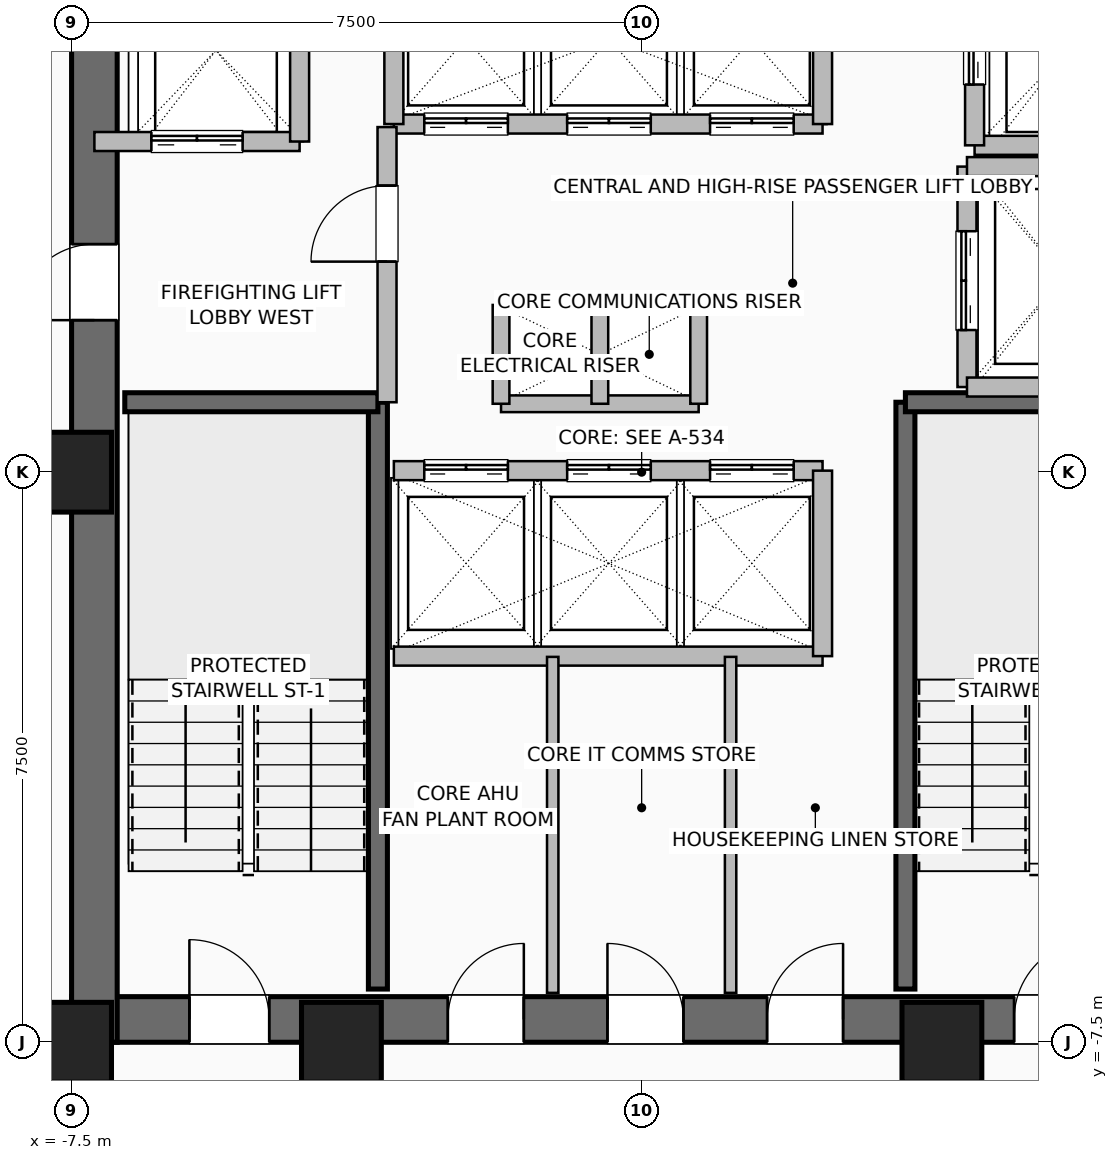
"""IFC4 building model, lengths in metres.
Left out: names, types, materials, properties, quantities, classifications, styles, units other than length and angle.
Written with IfcOpenShell. Run it as: python <this file> out.ifc"""

import sys

from ifc_helpers import new_model, si_unit, direction, frame, frame_2d, origin, origin_2d, place, context, subcontext, project, spatial, rectangle, hollow_rectangle, extrude, element, fill, save


model = new_model("IFC4")
c1 = context("Model", 3, precision=1e-05, world=origin(), true_north=direction((0.0, 1.0)))
c2 = subcontext(c1, "Body", "Model", "MODEL_VIEW")
j1 = project(units=[si_unit("LENGTHUNIT", "METRE"), si_unit("PLANEANGLEUNIT", "RADIAN")], contexts=[c1])
p1 = place(None, origin())
s1 = spatial("IfcSite", under=j1, at=p1, CompositionType="ELEMENT")
p2 = place(p1, origin())
s2 = spatial("IfcBuilding", under=s1, at=p2, CompositionType="ELEMENT")
p3 = place(p2, frame((0.0, 0.0, 130.0)))
s3 = spatial("IfcBuildingStorey", under=s2, at=p3, CompositionType="ELEMENT", Elevation=130.0)
for number, where, z_axis, x_axis in (
    (1, (-7.5, -7.5, 0.0), (0.0, 0.0, 1.0), (1.0, 0.0, 0.0)),
    (2, (-3.95, -7.5, 0.0), (0.0, 0.0, 1.0), (1.0, 0.0, 0.0)),
    (3, (3.95, -7.5, 0.0), (0.0, 0.0, 1.0), (1.0, 0.0, 0.0)),
    (4, (-7.5, 0.0, 0.0), (0.0, 0.0, 1.0), (1.0, 0.0, 0.0)),
):
    element("IfcColumn", number, at=place(p3, frame(where, z_axis=z_axis, x_axis=x_axis)), inside=s3, PredefinedType="COLUMN", context=c2, shape_type="SweptSolid", body=[
        extrude(hollow_rectangle(XDim=1.05, YDim=1.05, WallThickness=0.05, at=origin_2d()), origin(), (0.0, 0.0, 1.0), 3.6),
    ])
p4 = place(p3, frame((-7.5, -7.2, 0.0), z_axis=(0.0, 0.0, 1.0), x_axis=(1.0, 0.0, 0.0)))
e5 = element("IfcWall", 5, at=p4, inside=s3, PredefinedType="SHEAR", context=c2, shape_type="SweptSolid", body=[
    extrude(rectangle(XDim=15.0, YDim=0.6, at=frame_2d((7.5, 0.0))), origin(), (0.0, 0.0, 1.0), 3.36),
])
p5 = place(p4, frame((1.55, 0.0, 0.0)))
e6 = element("IfcOpeningElement", 6, at=p5, cuts=e5, PredefinedType="OPENING", context=c2, shape_type="SweptSolid", body=[
    extrude(rectangle(XDim=1.05, YDim=2.08, at=frame_2d((0.525, 1.04))), frame((0.0, 0.31, 0.0), z_axis=(0.0, -1.0, 0.0), x_axis=(1.0, 0.0, 0.0)), (0.0, 0.0, 1.0), 0.62),
])
p6 = place(p4, frame((12.4, 0.0, 0.0)))
e7 = element("IfcOpeningElement", 7, at=p6, cuts=e5, PredefinedType="OPENING", context=c2, shape_type="SweptSolid", body=[
    extrude(rectangle(XDim=1.05, YDim=2.08, at=frame_2d((0.525, 1.04))), frame((0.0, 0.31, 0.0), z_axis=(0.0, -1.0, 0.0), x_axis=(1.0, 0.0, 0.0)), (0.0, 0.0, 1.0), 0.62),
])
p7 = place(p4, frame((4.95, 0.0, 0.0)))
e8 = element("IfcOpeningElement", 8, at=p7, cuts=e5, PredefinedType="OPENING", context=c2, shape_type="SweptSolid", body=[
    extrude(rectangle(XDim=1.0, YDim=2.08, at=frame_2d((0.5, 1.04))), frame((0.0, 0.31, 0.0), z_axis=(0.0, -1.0, 0.0), x_axis=(1.0, 0.0, 0.0)), (0.0, 0.0, 1.0), 0.62),
])
p8 = place(p4, frame((7.05, 0.0, 0.0)))
e9 = element("IfcOpeningElement", 9, at=p8, cuts=e5, PredefinedType="OPENING", context=c2, shape_type="SweptSolid", body=[
    extrude(rectangle(XDim=1.0, YDim=2.08, at=frame_2d((0.5, 1.04))), frame((0.0, 0.31, 0.0), z_axis=(0.0, -1.0, 0.0), x_axis=(1.0, 0.0, 0.0)), (0.0, 0.0, 1.0), 0.62),
])
p9 = place(p4, frame((9.15, 0.0, 0.0)))
e10 = element("IfcOpeningElement", 10, at=p9, cuts=e5, PredefinedType="OPENING", context=c2, shape_type="SweptSolid", body=[
    extrude(rectangle(XDim=1.0, YDim=2.08, at=frame_2d((0.5, 1.04))), frame((0.0, 0.31, 0.0), z_axis=(0.0, -1.0, 0.0), x_axis=(1.0, 0.0, 0.0)), (0.0, 0.0, 1.0), 0.62),
])
p10 = place(p3, frame((-7.2, -7.5, 0.0), z_axis=(0.0, 0.0, 1.0), x_axis=(0.0, 1.0, 0.0)))
e11 = element("IfcWall", 11, at=p10, inside=s3, PredefinedType="SHEAR", context=c2, shape_type="SweptSolid", body=[
    extrude(rectangle(XDim=15.0, YDim=0.6, at=frame_2d((7.5, 0.0))), origin(), (0.0, 0.0, 1.0), 3.36),
])
p11 = place(p10, frame((9.5, 0.0, 0.0)))
e12 = element("IfcOpeningElement", 12, at=p11, cuts=e11, PredefinedType="OPENING", context=c2, shape_type="SweptSolid", body=[
    extrude(rectangle(XDim=1.0, YDim=2.08, at=frame_2d((0.5, 1.04))), frame((0.0, 0.31, 0.0), z_axis=(0.0, -1.0, 0.0), x_axis=(1.0, 0.0, 0.0)), (0.0, 0.0, 1.0), 0.62),
])
p12 = place(p3, frame((-3.47, -6.8, 0.0), z_axis=(0.0, 0.0, 1.0), x_axis=(0.0, 1.0, 0.0)))
e13 = element("IfcWall", 13, at=p12, inside=s3, PredefinedType="SHEAR", context=c2, shape_type="SweptSolid", body=[
    extrude(rectangle(XDim=7.72, YDim=0.25, at=frame_2d((3.86, 0.0))), origin(), (0.0, 0.0, 1.0), 3.36),
])
p13 = place(p3, frame((-6.8, 0.92, 0.0), z_axis=(0.0, 0.0, 1.0), x_axis=(1.0, 0.0, 0.0)))
e14 = element("IfcWall", 14, at=p13, inside=s3, PredefinedType="SHEAR", context=c2, shape_type="SweptSolid", body=[
    extrude(rectangle(XDim=3.33, YDim=0.25, at=frame_2d((1.665, 0.0))), origin(), (0.0, 0.0, 1.0), 3.36),
])
p14 = place(p3, frame((3.47, -6.8, 0.0), z_axis=(0.0, 0.0, 1.0), x_axis=(0.0, 1.0, 0.0)))
e15 = element("IfcWall", 15, at=p14, inside=s3, PredefinedType="SHEAR", context=c2, shape_type="SweptSolid", body=[
    extrude(rectangle(XDim=7.72, YDim=0.25, at=frame_2d((3.86, 0.0))), origin(), (0.0, 0.0, 1.0), 3.36),
])
p15 = place(p3, frame((3.47, 0.92, 0.0), z_axis=(0.0, 0.0, 1.0), x_axis=(1.0, 0.0, 0.0)))
e16 = element("IfcWall", 16, at=p15, inside=s3, PredefinedType="SHEAR", context=c2, shape_type="SweptSolid", body=[
    extrude(rectangle(XDim=3.33, YDim=0.25, at=frame_2d((1.665, 0.0))), origin(), (0.0, 0.0, 1.0), 3.36),
])
for number, where, z_axis, x_axis in (
    (17, (-1.85, 2.2, 0.0), (0.0, 0.0, 1.0), (1.0, 0.0, 0.0)),
    (18, (-1.85, 0.9, 0.0), (0.0, 0.0, 1.0), (1.0, 0.0, 0.0)),
):
    element("IfcWall", number, at=place(p3, frame(where, z_axis=z_axis, x_axis=x_axis)), inside=s3, PredefinedType="PARTITIONING", context=c2, shape_type="SweptSolid", body=[
        extrude(rectangle(XDim=2.6, YDim=0.22, at=frame_2d((1.3, 0.0))), origin(), (0.0, 0.0, 1.0), 3.36),
    ])
for number, where, z_axis, x_axis in (
    (19, (-0.55, 0.9, 0.0), (0.0, 0.0, 1.0), (0.0, 1.0, 0.0)),
    (20, (0.75, 0.9, 0.0), (0.0, 0.0, 1.0), (0.0, 1.0, 0.0)),
    (21, (-1.85, 0.9, 0.0), (0.0, 0.0, 1.0), (0.0, 1.0, 0.0)),
):
    element("IfcWall", number, at=place(p3, frame(where, z_axis=z_axis, x_axis=x_axis)), inside=s3, PredefinedType="PARTITIONING", context=c2, shape_type="SweptSolid", body=[
        extrude(rectangle(XDim=1.3, YDim=0.22, at=frame_2d((0.65, 0.0))), origin(), (0.0, 0.0, 1.0), 3.36),
    ])
p16 = place(p3, frame((-3.26, 0.02, 0.0), z_axis=(0.0, 0.0, 1.0), x_axis=(1.0, 0.0, 0.0)))
e22 = element("IfcWall", 22, at=p16, inside=s3, PredefinedType="SHEAR", context=c2, shape_type="SweptSolid", body=[
    extrude(rectangle(XDim=5.64, YDim=0.25, at=frame_2d((2.82, 0.0))), origin(), (0.0, 0.0, 1.0), 3.36),
])
p17 = place(p16, frame((0.4, 0.0, 0.0)))
e23 = element("IfcOpeningElement", 23, at=p17, cuts=e22, PredefinedType="OPENING", context=c2, shape_type="SweptSolid", body=[
    extrude(rectangle(XDim=1.1, YDim=2.2, at=frame_2d((0.55, 1.1))), frame((0.0, 0.135, 0.0), z_axis=(0.0, -1.0, 0.0), x_axis=(1.0, 0.0, 0.0)), (0.0, 0.0, 1.0), 0.27),
])
p18 = place(p16, frame((2.28, 0.0, 0.0)))
e24 = element("IfcOpeningElement", 24, at=p18, cuts=e22, PredefinedType="OPENING", context=c2, shape_type="SweptSolid", body=[
    extrude(rectangle(XDim=1.1, YDim=2.2, at=frame_2d((0.55, 1.1))), frame((0.0, 0.135, 0.0), z_axis=(0.0, -1.0, 0.0), x_axis=(1.0, 0.0, 0.0)), (0.0, 0.0, 1.0), 0.27),
])
p19 = place(p16, frame((4.16, 0.0, 0.0)))
e25 = element("IfcOpeningElement", 25, at=p19, cuts=e22, PredefinedType="OPENING", context=c2, shape_type="SweptSolid", body=[
    extrude(rectangle(XDim=1.1, YDim=2.2, at=frame_2d((0.55, 1.1))), frame((0.0, 0.135, 0.0), z_axis=(0.0, -1.0, 0.0), x_axis=(1.0, 0.0, 0.0)), (0.0, 0.0, 1.0), 0.27),
])
p20 = place(p3, frame((-3.26, -2.42, 0.0), z_axis=(0.0, 0.0, 1.0), x_axis=(1.0, 0.0, 0.0)))
e26 = element("IfcWall", 26, at=p20, inside=s3, PredefinedType="SHEAR", context=c2, shape_type="SweptSolid", body=[
    extrude(rectangle(XDim=5.64, YDim=0.25, at=frame_2d((2.82, 0.0))), origin(), (0.0, 0.0, 1.0), 3.36),
])
p21 = place(p3, frame((2.38, -2.42, 0.0), z_axis=(0.0, 0.0, 1.0), x_axis=(0.0, 1.0, 0.0)))
e27 = element("IfcWall", 27, at=p21, inside=s3, PredefinedType="SHEAR", context=c2, shape_type="SweptSolid", body=[
    extrude(rectangle(XDim=2.44, YDim=0.25, at=frame_2d((1.22, 0.0))), origin(), (0.0, 0.0, 1.0), 3.36),
])
p22 = place(p3, frame((-3.26, 4.58, 0.0), z_axis=(0.0, 0.0, 1.0), x_axis=(1.0, 0.0, 0.0)))
e28 = element("IfcWall", 28, at=p22, inside=s3, PredefinedType="SHEAR", context=c2, shape_type="SweptSolid", body=[
    extrude(rectangle(XDim=5.64, YDim=0.25, at=frame_2d((2.82, 0.0))), origin(), (0.0, 0.0, 1.0), 3.36),
])
p23 = place(p22, frame((0.4, 0.0, 0.0)))
e29 = element("IfcOpeningElement", 29, at=p23, cuts=e28, PredefinedType="OPENING", context=c2, shape_type="SweptSolid", body=[
    extrude(rectangle(XDim=1.1, YDim=2.2, at=frame_2d((0.55, 1.1))), frame((0.0, 0.135, 0.0), z_axis=(0.0, -1.0, 0.0), x_axis=(1.0, 0.0, 0.0)), (0.0, 0.0, 1.0), 0.27),
])
p24 = place(p22, frame((2.28, 0.0, 0.0)))
e30 = element("IfcOpeningElement", 30, at=p24, cuts=e28, PredefinedType="OPENING", context=c2, shape_type="SweptSolid", body=[
    extrude(rectangle(XDim=1.1, YDim=2.2, at=frame_2d((0.55, 1.1))), frame((0.0, 0.135, 0.0), z_axis=(0.0, -1.0, 0.0), x_axis=(1.0, 0.0, 0.0)), (0.0, 0.0, 1.0), 0.27),
])
p25 = place(p22, frame((4.16, 0.0, 0.0)))
e31 = element("IfcOpeningElement", 31, at=p25, cuts=e28, PredefinedType="OPENING", context=c2, shape_type="SweptSolid", body=[
    extrude(rectangle(XDim=1.1, YDim=2.2, at=frame_2d((0.55, 1.1))), frame((0.0, 0.135, 0.0), z_axis=(0.0, -1.0, 0.0), x_axis=(1.0, 0.0, 0.0)), (0.0, 0.0, 1.0), 0.27),
])
for number, where, z_axis, x_axis in (
    (32, (-3.26, 4.58, 0.0), (0.0, 0.0, 1.0), (0.0, 1.0, 0.0)),
    (33, (2.38, 4.58, 0.0), (0.0, 0.0, 1.0), (0.0, 1.0, 0.0)),
):
    element("IfcWall", number, at=place(p3, frame(where, z_axis=z_axis, x_axis=x_axis)), inside=s3, PredefinedType="SHEAR", context=c2, shape_type="SweptSolid", body=[
        extrude(rectangle(XDim=2.22, YDim=0.25, at=frame_2d((1.11, 0.0))), origin(), (0.0, 0.0, 1.0), 3.36),
    ])
p26 = place(p3, frame((-7.2, 4.35, 0.0), z_axis=(0.0, 0.0, 1.0), x_axis=(1.0, 0.0, 0.0)))
e34 = element("IfcWall", 34, at=p26, inside=s3, PredefinedType="SHEAR", context=c2, shape_type="SweptSolid", body=[
    extrude(rectangle(XDim=2.7, YDim=0.25, at=frame_2d((1.35, 0.0))), origin(), (0.0, 0.0, 1.0), 3.36),
])
p27 = place(p26, frame((0.75, 0.0, 0.0)))
e35 = element("IfcOpeningElement", 35, at=p27, cuts=e34, PredefinedType="OPENING", context=c2, shape_type="SweptSolid", body=[
    extrude(rectangle(XDim=1.2, YDim=2.2, at=frame_2d((0.6, 1.1))), frame((0.0, 0.135, 0.0), z_axis=(0.0, -1.0, 0.0), x_axis=(1.0, 0.0, 0.0)), (0.0, 0.0, 1.0), 0.27),
])
p28 = place(p3, frame((-4.5, 4.35, 0.0), z_axis=(0.0, 0.0, 1.0), x_axis=(0.0, 1.0, 0.0)))
e36 = element("IfcWall", 36, at=p28, inside=s3, PredefinedType="SHEAR", context=c2, shape_type="SweptSolid", body=[
    extrude(rectangle(XDim=2.85, YDim=0.25, at=frame_2d((1.425, 0.0))), origin(), (0.0, 0.0, 1.0), 3.36),
])
p29 = place(p3, frame((4.38, 4.3, 0.0), z_axis=(0.0, 0.0, 1.0), x_axis=(1.0, 0.0, 0.0)))
e37 = element("IfcWall", 37, at=p29, inside=s3, PredefinedType="SHEAR", context=c2, shape_type="SweptSolid", body=[
    extrude(rectangle(XDim=2.42, YDim=0.25, at=frame_2d((1.21, 0.0))), origin(), (0.0, 0.0, 1.0), 3.36),
])
p30 = place(p3, frame((4.38, 4.3, 0.0), z_axis=(0.0, 0.0, 1.0), x_axis=(0.0, 1.0, 0.0)))
e38 = element("IfcWall", 38, at=p30, inside=s3, PredefinedType="SHEAR", context=c2, shape_type="SweptSolid", body=[
    extrude(rectangle(XDim=2.5, YDim=0.25, at=frame_2d((1.25, 0.0))), origin(), (0.0, 0.0, 1.0), 3.36),
])
p31 = place(p30, frame((0.8, 0.0, 0.0)))
e39 = element("IfcOpeningElement", 39, at=p31, cuts=e38, PredefinedType="OPENING", context=c2, shape_type="SweptSolid", body=[
    extrude(rectangle(XDim=1.2, YDim=2.2, at=frame_2d((0.6, 1.1))), frame((0.0, 0.135, 0.0), z_axis=(0.0, -1.0, 0.0), x_axis=(1.0, 0.0, 0.0)), (0.0, 0.0, 1.0), 0.27),
])
p32 = place(p3, frame((4.28, 1.12, 0.0), z_axis=(0.0, 0.0, 1.0), x_axis=(0.0, 1.0, 0.0)))
e40 = element("IfcWall", 40, at=p32, inside=s3, PredefinedType="SHEAR", context=c2, shape_type="SweptSolid", body=[
    extrude(rectangle(XDim=2.9, YDim=0.25, at=frame_2d((1.45, 0.0))), origin(), (0.0, 0.0, 1.0), 3.36),
])
p33 = place(p32, frame((0.75, 0.0, 0.0)))
e41 = element("IfcOpeningElement", 41, at=p33, cuts=e40, PredefinedType="OPENING", context=c2, shape_type="SweptSolid", body=[
    extrude(rectangle(XDim=1.3, YDim=2.3, at=frame_2d((0.65, 1.15))), frame((0.0, 0.135, 0.0), z_axis=(0.0, -1.0, 0.0), x_axis=(1.0, 0.0, 0.0)), (0.0, 0.0, 1.0), 0.27),
])
for number, where, z_axis, x_axis in (
    (42, (4.28, 1.12, 0.0), (0.0, 0.0, 1.0), (1.0, 0.0, 0.0)),
    (43, (4.28, 4.02, 0.0), (0.0, 0.0, 1.0), (1.0, 0.0, 0.0)),
):
    element("IfcWall", number, at=place(p3, frame(where, z_axis=z_axis, x_axis=x_axis)), inside=s3, PredefinedType="SHEAR", context=c2, shape_type="SweptSolid", body=[
        extrude(rectangle(XDim=2.52, YDim=0.25, at=frame_2d((1.26, 0.0))), origin(), (0.0, 0.0, 1.0), 3.36),
    ])
p34 = place(p3, frame((-3.35, 0.92, 0.0), z_axis=(0.0, 0.0, 1.0), x_axis=(0.0, 1.0, 0.0)))
e44 = element("IfcWall", 44, at=p34, inside=s3, PredefinedType="SHEAR", context=c2, shape_type="SweptSolid", body=[
    extrude(rectangle(XDim=3.62, YDim=0.25, at=frame_2d((1.81, 0.0))), origin(), (0.0, 0.0, 1.0), 3.36),
])
p35 = place(p34, frame((1.85, 0.0, 0.0)))
e45 = element("IfcOpeningElement", 45, at=p35, cuts=e44, PredefinedType="OPENING", context=c2, shape_type="SweptSolid", body=[
    extrude(rectangle(XDim=1.0, YDim=2.08, at=frame_2d((0.5, 1.04))), frame((0.0, 0.135, 0.0), z_axis=(0.0, -1.0, 0.0), x_axis=(1.0, 0.0, 0.0)), (0.0, 0.0, 1.0), 0.27),
])
for number, where, z_axis, x_axis in (
    (46, (-1.17, -6.85, 0.0), (0.0, 0.0, 1.0), (0.0, 1.0, 0.0)),
    (47, (1.17, -6.85, 0.0), (0.0, 0.0, 1.0), (0.0, 1.0, 0.0)),
):
    element("IfcWall", number, at=place(p3, frame(where, z_axis=z_axis, x_axis=x_axis)), inside=s3, PredefinedType="PARTITIONING", context=c2, shape_type="SweptSolid", body=[
        extrude(rectangle(XDim=4.42, YDim=0.15, at=frame_2d((2.21, 0.0))), origin(), (0.0, 0.0, 1.0), 3.36),
    ])
p36 = place(p5, origin())
e48 = element("IfcDoor", 48, at=p36, inside=s3, OperationType="SINGLE_SWING_LEFT", PredefinedType="DOOR", context=c2, shape_type="SweptSolid", body=[
    extrude(rectangle(XDim=1.05, YDim=2.08, at=frame_2d((0.525, 1.04))), frame((0.0, 0.025, 0.0), z_axis=(0.0, -1.0, 0.0), x_axis=(1.0, 0.0, 0.0)), (0.0, 0.0, 1.0), 0.05),
])
fill(e6, e48)
p37 = place(p6, origin())
e49 = element("IfcDoor", 49, at=p37, inside=s3, OperationType="SINGLE_SWING_RIGHT", PredefinedType="DOOR", context=c2, shape_type="SweptSolid", body=[
    extrude(rectangle(XDim=1.05, YDim=2.08, at=frame_2d((0.525, 1.04))), frame((0.0, 0.025, 0.0), z_axis=(0.0, -1.0, 0.0), x_axis=(1.0, 0.0, 0.0)), (0.0, 0.0, 1.0), 0.05),
])
fill(e7, e49)
p38 = place(p11, origin())
e50 = element("IfcDoor", 50, at=p38, inside=s3, OperationType="SINGLE_SWING_LEFT", PredefinedType="DOOR", context=c2, shape_type="SweptSolid", body=[
    extrude(rectangle(XDim=1.0, YDim=2.08, at=frame_2d((0.5, 1.04))), frame((0.0, 0.025, 0.0), z_axis=(0.0, -1.0, 0.0), x_axis=(1.0, 0.0, 0.0)), (0.0, 0.0, 1.0), 0.05),
])
fill(e12, e50)
p39 = place(p7, origin())
e51 = element("IfcDoor", 51, at=p39, inside=s3, OperationType="SINGLE_SWING_RIGHT", PredefinedType="DOOR", context=c2, shape_type="SweptSolid", body=[
    extrude(rectangle(XDim=1.0, YDim=2.08, at=frame_2d((0.5, 1.04))), frame((0.0, 0.025, 0.0), z_axis=(0.0, -1.0, 0.0), x_axis=(1.0, 0.0, 0.0)), (0.0, 0.0, 1.0), 0.05),
])
fill(e8, e51)
p40 = place(p8, origin())
e52 = element("IfcDoor", 52, at=p40, inside=s3, OperationType="SINGLE_SWING_LEFT", PredefinedType="DOOR", context=c2, shape_type="SweptSolid", body=[
    extrude(rectangle(XDim=1.0, YDim=2.08, at=frame_2d((0.5, 1.04))), frame((0.0, 0.025, 0.0), z_axis=(0.0, -1.0, 0.0), x_axis=(1.0, 0.0, 0.0)), (0.0, 0.0, 1.0), 0.05),
])
fill(e9, e52)
p41 = place(p9, origin())
e53 = element("IfcDoor", 53, at=p41, inside=s3, OperationType="SINGLE_SWING_RIGHT", PredefinedType="DOOR", context=c2, shape_type="SweptSolid", body=[
    extrude(rectangle(XDim=1.0, YDim=2.08, at=frame_2d((0.5, 1.04))), frame((0.0, 0.025, 0.0), z_axis=(0.0, -1.0, 0.0), x_axis=(1.0, 0.0, 0.0)), (0.0, 0.0, 1.0), 0.05),
])
fill(e10, e53)
p42 = place(p17, origin())
e54 = element("IfcDoor", 54, at=p42, inside=s3, OperationType="DOUBLE_DOOR_SLIDING", PredefinedType="DOOR", context=c2, shape_type="SweptSolid", body=[
    extrude(rectangle(XDim=1.1, YDim=2.2, at=frame_2d((0.55, 1.1))), frame((0.0, 0.025, 0.0), z_axis=(0.0, -1.0, 0.0), x_axis=(1.0, 0.0, 0.0)), (0.0, 0.0, 1.0), 0.05),
])
fill(e23, e54)
p43 = place(p18, origin())
e55 = element("IfcDoor", 55, at=p43, inside=s3, OperationType="DOUBLE_DOOR_SLIDING", PredefinedType="DOOR", context=c2, shape_type="SweptSolid", body=[
    extrude(rectangle(XDim=1.1, YDim=2.2, at=frame_2d((0.55, 1.1))), frame((0.0, 0.025, 0.0), z_axis=(0.0, -1.0, 0.0), x_axis=(1.0, 0.0, 0.0)), (0.0, 0.0, 1.0), 0.05),
])
fill(e24, e55)
p44 = place(p19, origin())
e56 = element("IfcDoor", 56, at=p44, inside=s3, OperationType="DOUBLE_DOOR_SLIDING", PredefinedType="DOOR", context=c2, shape_type="SweptSolid", body=[
    extrude(rectangle(XDim=1.1, YDim=2.2, at=frame_2d((0.55, 1.1))), frame((0.0, 0.025, 0.0), z_axis=(0.0, -1.0, 0.0), x_axis=(1.0, 0.0, 0.0)), (0.0, 0.0, 1.0), 0.05),
])
fill(e25, e56)
p45 = place(p23, origin())
e57 = element("IfcDoor", 57, at=p45, inside=s3, OperationType="DOUBLE_DOOR_SLIDING", PredefinedType="DOOR", context=c2, shape_type="SweptSolid", body=[
    extrude(rectangle(XDim=1.1, YDim=2.2, at=frame_2d((0.55, 1.1))), frame((0.0, 0.025, 0.0), z_axis=(0.0, -1.0, 0.0), x_axis=(1.0, 0.0, 0.0)), (0.0, 0.0, 1.0), 0.05),
])
fill(e29, e57)
p46 = place(p24, origin())
e58 = element("IfcDoor", 58, at=p46, inside=s3, OperationType="DOUBLE_DOOR_SLIDING", PredefinedType="DOOR", context=c2, shape_type="SweptSolid", body=[
    extrude(rectangle(XDim=1.1, YDim=2.2, at=frame_2d((0.55, 1.1))), frame((0.0, 0.025, 0.0), z_axis=(0.0, -1.0, 0.0), x_axis=(1.0, 0.0, 0.0)), (0.0, 0.0, 1.0), 0.05),
])
fill(e30, e58)
p47 = place(p25, origin())
e59 = element("IfcDoor", 59, at=p47, inside=s3, OperationType="DOUBLE_DOOR_SLIDING", PredefinedType="DOOR", context=c2, shape_type="SweptSolid", body=[
    extrude(rectangle(XDim=1.1, YDim=2.2, at=frame_2d((0.55, 1.1))), frame((0.0, 0.025, 0.0), z_axis=(0.0, -1.0, 0.0), x_axis=(1.0, 0.0, 0.0)), (0.0, 0.0, 1.0), 0.05),
])
fill(e31, e59)
p48 = place(p27, origin())
e60 = element("IfcDoor", 60, at=p48, inside=s3, OperationType="DOUBLE_DOOR_SLIDING", PredefinedType="DOOR", context=c2, shape_type="SweptSolid", body=[
    extrude(rectangle(XDim=1.2, YDim=2.2, at=frame_2d((0.6, 1.1))), frame((0.0, 0.025, 0.0), z_axis=(0.0, -1.0, 0.0), x_axis=(1.0, 0.0, 0.0)), (0.0, 0.0, 1.0), 0.05),
])
fill(e35, e60)
p49 = place(p31, origin())
e61 = element("IfcDoor", 61, at=p49, inside=s3, OperationType="DOUBLE_DOOR_SLIDING", PredefinedType="DOOR", context=c2, shape_type="SweptSolid", body=[
    extrude(rectangle(XDim=1.2, YDim=2.2, at=frame_2d((0.6, 1.1))), frame((0.0, 0.025, 0.0), z_axis=(0.0, -1.0, 0.0), x_axis=(1.0, 0.0, 0.0)), (0.0, 0.0, 1.0), 0.05),
])
fill(e39, e61)
p50 = place(p33, origin())
e62 = element("IfcDoor", 62, at=p50, inside=s3, OperationType="DOUBLE_DOOR_SLIDING", PredefinedType="DOOR", context=c2, shape_type="SweptSolid", body=[
    extrude(rectangle(XDim=1.3, YDim=2.3, at=frame_2d((0.65, 1.15))), frame((0.0, 0.025, 0.0), z_axis=(0.0, -1.0, 0.0), x_axis=(1.0, 0.0, 0.0)), (0.0, 0.0, 1.0), 0.05),
])
fill(e41, e62)
p51 = place(p35, origin())
e63 = element("IfcDoor", 63, at=p51, inside=s3, OperationType="SINGLE_SWING_LEFT", PredefinedType="DOOR", context=c2, shape_type="SweptSolid", body=[
    extrude(rectangle(XDim=1.0, YDim=2.08, at=frame_2d((0.5, 1.04))), frame((0.0, 0.025, 0.0), z_axis=(0.0, -1.0, 0.0), x_axis=(1.0, 0.0, 0.0)), (0.0, 0.0, 1.0), 0.05),
])
fill(e45, e63)
save(model, sys.argv[1])
